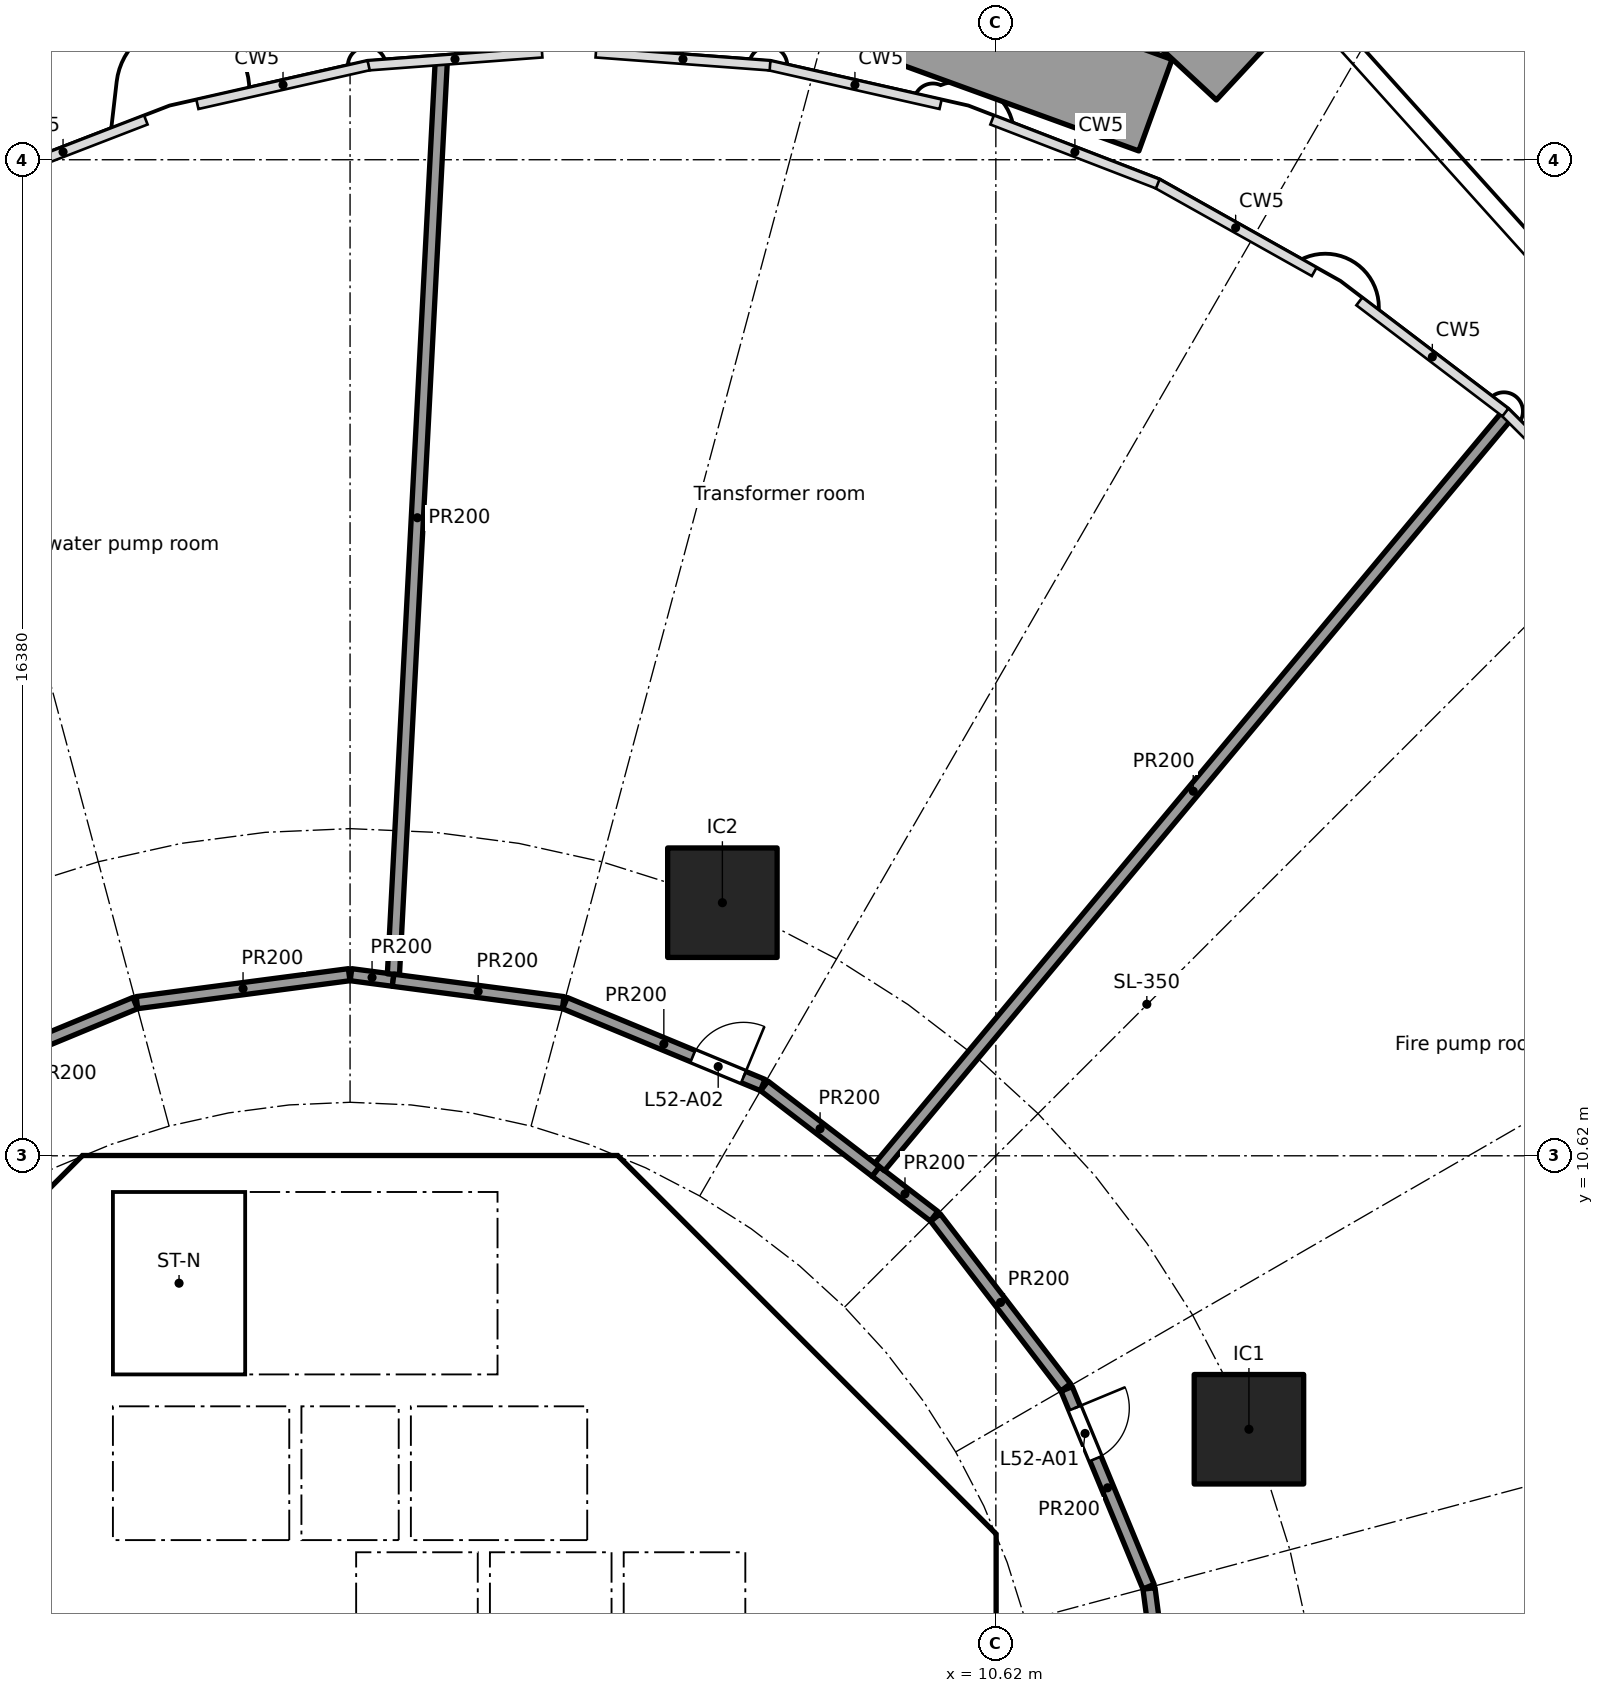
"""IFC4 building model, lengths in metres.
Left out: names, types, materials, properties, quantities, classifications, styles, units other than length and angle.
Written with IfcOpenShell. Run it as: python <this file> out.ifc"""

import sys

from ifc_helpers import new_model, si_unit, direction, frame, frame_2d, origin, origin_2d, place, context, subcontext, project, spatial, polyline, rectangle, outline, extrude, element, fill, save


model = new_model("IFC4")
c1 = context("Model", 3, precision=1e-05, world=origin(), true_north=direction((0.0, 1.0)))
c2 = subcontext(c1, "Body", "Model", "MODEL_VIEW")
j1 = project(units=[si_unit("LENGTHUNIT", "METRE"), si_unit("PLANEANGLEUNIT", "RADIAN")], contexts=[c1])
p1 = place(None, origin())
s1 = spatial("IfcSite", under=j1, at=p1, CompositionType="ELEMENT")
p2 = place(p1, origin())
s2 = spatial("IfcBuilding", under=s1, at=p2, CompositionType="ELEMENT")
p3 = place(p2, frame((0.0, 0.0, 206.6)))
s3 = spatial("IfcBuildingStorey", under=s2, at=p3, CompositionType="ELEMENT", Elevation=206.6)
for number, where, z_axis, x_axis in (
    (1, (14.782, 6.123, 0.0), (0.0, 0.0, 1.0), (1.0, 0.0, 0.0)),
    (2, (6.123, 14.782, 0.0), (0.0, 0.0, 1.0), (1.0, 0.0, 0.0)),
):
    element("IfcColumn", number, at=place(p3, frame(where, z_axis=z_axis, x_axis=x_axis)), inside=s3, PredefinedType="COLUMN", context=c2, shape_type="SweptSolid", body=[
        extrude(rectangle(XDim=1.8, YDim=1.8, at=origin_2d()), origin(), (0.0, 0.0, 1.0), 5.6),
    ])
p4 = place(p3, frame((11.664, 31.47, 0.0), z_axis=(0.0, 0.0, 1.0), x_axis=(0.733056421421, -0.680167834445, 0.0)))
e3 = element("IfcWall", 3, at=p4, inside=s3, PredefinedType="SOLIDWALL", context=c2, shape_type="SweptSolid", body=[
    extrude(rectangle(XDim=4.265, YDim=1.6, at=frame_2d((2.133, 0.0))), origin(), (0.0, 0.0, 1.0), 1.1),
])
p5 = place(p3, frame((13.244, 27.896, 0.0), z_axis=(0.0, 0.0, 1.0), x_axis=(-0.939927628881, 0.341373772376, 0.0)))
e4 = element("IfcWall", 4, at=p5, inside=s3, PredefinedType="SOLIDWALL", context=c2, shape_type="SweptSolid", body=[
    extrude(rectangle(XDim=10.033, YDim=1.6, at=frame_2d((5.017, 0.0))), origin(), (0.0, 0.0, 1.0), 1.1),
])
p6 = place(p3, frame((9.988, 4.613, 0.0), z_axis=(0.0, 0.0, 1.0), x_axis=(-0.707106781187, 0.707106781187, 0.0)))
e5 = element("IfcWall", 5, at=p6, inside=s3, PredefinedType="SHEAR", context=c2, shape_type="SweptSolid", body=[
    extrude(rectangle(XDim=7.602, YDim=0.6, at=frame_2d((3.801, 0.0))), origin(), (0.0, 0.0, 1.0), 5.34),
])
p7 = place(p6, frame((3.201, 0.0, 0.0)))
e6 = element("IfcOpeningElement", 6, at=p7, cuts=e5, PredefinedType="OPENING", context=c2, shape_type="SweptSolid", body=[
    extrude(rectangle(XDim=1.2, YDim=2.1, at=frame_2d((0.6, 1.05))), frame((0.0, 0.31, 0.0), z_axis=(0.0, -1.0, 0.0), x_axis=(1.0, 0.0, 0.0)), (0.0, 0.0, 1.0), 0.62),
])
p8 = place(p3, frame((-4.613, 9.988, 0.0), z_axis=(0.0, 0.0, 1.0), x_axis=(-0.707106781187, -0.707106781187, 0.0)))
e7 = element("IfcWall", 7, at=p8, inside=s3, PredefinedType="SHEAR", context=c2, shape_type="SweptSolid", body=[
    extrude(rectangle(XDim=7.602, YDim=0.6, at=frame_2d((3.801, 0.0))), origin(), (0.0, 0.0, 1.0), 5.34),
])
p9 = place(p8, frame((0.351, 0.0, 0.0)))
e8 = element("IfcOpeningElement", 8, at=p9, cuts=e7, PredefinedType="OPENING", context=c2, shape_type="SweptSolid", body=[
    extrude(rectangle(XDim=1.1, YDim=2.1, at=frame_2d((0.55, 1.05))), frame((0.0, 0.31, 0.0), z_axis=(0.0, -1.0, 0.0), x_axis=(1.0, 0.0, 0.0)), (0.0, 0.0, 1.0), 0.62),
])
p10 = place(p3, frame((4.0, 4.3, 0.0), z_axis=(0.0, 0.0, 1.0), x_axis=(0.0, 1.0, 0.0)))
e9 = element("IfcWall", 9, at=p10, inside=s3, PredefinedType="SOLIDWALL", context=c2, shape_type="SweptSolid", body=[
    extrude(rectangle(XDim=2.2, YDim=0.2, at=frame_2d((1.1, 0.0))), origin(), (0.0, 0.0, 1.0), 5.34),
])
p11 = place(p10, frame((0.55, 0.0, 0.0)))
e10 = element("IfcOpeningElement", 10, at=p11, cuts=e9, PredefinedType="OPENING", context=c2, shape_type="SweptSolid", body=[
    extrude(rectangle(XDim=1.1, YDim=2.1, at=frame_2d((0.55, 1.05))), frame((0.0, 0.11, 0.0), z_axis=(0.0, -1.0, 0.0), x_axis=(1.0, 0.0, 0.0)), (0.0, 0.0, 1.0), 0.22),
])
p12 = place(p3, frame((-4.0, 4.3, 0.0), z_axis=(0.0, 0.0, 1.0), x_axis=(0.0, 1.0, 0.0)))
e11 = element("IfcWall", 11, at=p12, inside=s3, PredefinedType="SOLIDWALL", context=c2, shape_type="SweptSolid", body=[
    extrude(rectangle(XDim=2.2, YDim=0.2, at=frame_2d((1.1, 0.0))), origin(), (0.0, 0.0, 1.0), 5.34),
])
p13 = place(p12, frame((0.55, 0.0, 0.0)))
e12 = element("IfcOpeningElement", 12, at=p13, cuts=e11, PredefinedType="OPENING", context=c2, shape_type="SweptSolid", body=[
    extrude(rectangle(XDim=1.1, YDim=2.1, at=frame_2d((0.55, 1.05))), frame((0.0, 0.11, 0.0), z_axis=(0.0, -1.0, 0.0), x_axis=(1.0, 0.0, 0.0)), (0.0, 0.0, 1.0), 0.22),
])
p14 = place(p3, frame((6.7, 4.0, 0.0), z_axis=(0.0, 0.0, 1.0), x_axis=(1.0, 0.0, 0.0)))
e13 = element("IfcWall", 13, at=p14, inside=s3, PredefinedType="SOLIDWALL", context=c2, shape_type="SweptSolid", body=[
    extrude(rectangle(XDim=3.325, YDim=0.2, at=frame_2d((1.662, 0.0))), origin(), (0.0, 0.0, 1.0), 5.34),
])
p15 = place(p14, frame((1.25, 0.0, 0.0)))
e14 = element("IfcOpeningElement", 14, at=p15, cuts=e13, PredefinedType="OPENING", context=c2, shape_type="SweptSolid", body=[
    extrude(rectangle(XDim=1.1, YDim=2.1, at=frame_2d((0.55, 1.05))), frame((0.0, 0.11, 0.0), z_axis=(0.0, -1.0, 0.0), x_axis=(1.0, 0.0, 0.0)), (0.0, 0.0, 1.0), 0.22),
])
p16 = place(p3, frame((4.0, 7.025, 0.0), z_axis=(0.0, 0.0, 1.0), x_axis=(0.0, 1.0, 0.0)))
e15 = element("IfcWall", 15, at=p16, inside=s3, PredefinedType="SOLIDWALL", context=c2, shape_type="SweptSolid", body=[
    extrude(rectangle(XDim=3.0, YDim=0.2, at=frame_2d((1.5, 0.0))), origin(), (0.0, 0.0, 1.0), 5.34),
])
p17 = place(p16, frame((0.925, 0.0, 0.0)))
e16 = element("IfcOpeningElement", 16, at=p17, cuts=e15, PredefinedType="OPENING", context=c2, shape_type="SweptSolid", body=[
    extrude(rectangle(XDim=1.1, YDim=2.1, at=frame_2d((0.55, 1.05))), frame((0.0, 0.11, 0.0), z_axis=(0.0, -1.0, 0.0), x_axis=(1.0, 0.0, 0.0)), (0.0, 0.0, 1.0), 0.22),
])
p18 = place(p3, origin())
e17 = element("IfcWall", 17, at=p18, inside=s3, PredefinedType="SHEAR", context=c2, shape_type="SweptSolid", body=[
    extrude(outline(polyline([(-4.152, 10.025), (-4.401, 9.776), (-4.825, 10.2), (-4.401, 10.625), (4.401, 10.625), (4.825, 10.2), (4.401, 9.776), (4.152, 10.025), (-4.152, 10.025)])), origin(), (0.0, 0.0, 1.0), 5.34),
])
p19 = place(p3, origin())
e18 = element("IfcWall", 18, at=p19, inside=s3, PredefinedType="SHEAR", context=c2, shape_type="SweptSolid", body=[
    extrude(outline(polyline([(9.776, -4.401), (10.025, -4.152), (10.025, -3.801), (10.025, 4.152), (9.776, 4.401), (10.2, 4.825), (10.625, 4.401), (10.625, -4.401), (10.2, -4.825), (9.776, -4.401)])), origin(), (0.0, 0.0, 1.0), 5.34),
])
for number, where, z_axis, x_axis in (
    (19, (-0.9, 4.3, 0.0), (0.0, 0.0, 1.0), (0.0, 1.0, 0.0)),
    (20, (0.9, 4.3, 0.0), (0.0, 0.0, 1.0), (0.0, 1.0, 0.0)),
):
    element("IfcWall", number, at=place(p3, frame(where, z_axis=z_axis, x_axis=x_axis)), inside=s3, PredefinedType="SOLIDWALL", context=c2, shape_type="SweptSolid", body=[
        extrude(rectangle(XDim=2.2, YDim=0.2, at=frame_2d((1.1, 0.0))), origin(), (0.0, 0.0, 1.0), 5.34),
    ])
p20 = place(p3, origin())
e21 = element("IfcWall", 21, at=p20, inside=s3, PredefinedType="SOLIDWALL", context=c2, shape_type="SweptSolid", body=[
    extrude(outline(polyline([(-6.7, 4.3), (6.7, 4.3), (6.7, 2.1), (6.5, 2.1), (6.5, 4.1), (4.5, 4.1), (4.5, 2.1), (4.3, 2.1), (4.3, 4.1), (2.3, 4.1), (2.3, 2.1), (2.1, 2.1), (2.1, 4.1), (0.1, 4.1), (0.1, 2.1), (-0.1, 2.1), (-0.1, 4.1), (-4.3, 4.1), (-4.3, 2.1), (-4.5, 2.1), (-4.5, 4.1), (-6.5, 4.1), (-6.5, 2.1), (-6.7, 2.1), (-6.7, 4.3)])), origin(), (0.0, 0.0, 1.0), 5.34),
])
p21 = place(p3, origin())
e22 = element("IfcWall", 22, at=p21, inside=s3, PredefinedType="SOLIDWALL", context=c2, shape_type="SweptSolid", body=[
    extrude(outline(polyline([(-3.9, 7.025), (-4.1, 7.025), (-4.1, 10.025), (-3.9, 10.025), (-3.9, 7.025)])), origin(), (0.0, 0.0, 1.0), 5.34),
])
p22 = place(p3, origin())
e23 = element("IfcWall", 23, at=p22, inside=s3, PredefinedType="SOLIDWALL", context=c2, shape_type="SweptSolid", body=[
    extrude(outline(polyline([(4.1, 6.5), (-4.1, 6.5), (-4.1, 7.025), (4.1, 7.025), (4.1, 6.5)])), origin(), (0.0, 0.0, 1.0), 5.34),
])
p23 = place(p3, origin())
e24 = element("IfcWall", 24, at=p23, inside=s3, PredefinedType="SOLIDWALL", context=c2, shape_type="SweptSolid", body=[
    extrude(outline(polyline([(7.025, -3.9), (6.7, -3.9), (6.7, 3.9), (7.025, 3.9), (7.025, -3.9)])), origin(), (0.0, 0.0, 1.0), 5.34),
])
p24 = place(p3, frame((-6.786, 11.784, 0.0), z_axis=(0.0, 0.0, 1.0), x_axis=(0.92386297064, 0.382723413813, 0.0)))
e25 = element("IfcWall", 25, at=p24, inside=s3, PredefinedType="PARTITIONING", context=c2, shape_type="SweptSolid", body=[
    extrude(rectangle(XDim=3.52, YDim=0.2, at=frame_2d((1.76, 0.0))), origin(), (0.0, 0.0, 1.0), 5.34),
])
p25 = place(p24, frame((0.342, 0.0, 0.0)))
e26 = element("IfcOpeningElement", 26, at=p25, cuts=e25, PredefinedType="OPENING", context=c2, shape_type="SweptSolid", body=[
    extrude(rectangle(XDim=0.9, YDim=2.1, at=frame_2d((0.45, 1.05))), frame((0.0, 0.11, 0.0), z_axis=(0.0, -1.0, 0.0), x_axis=(1.0, 0.0, 0.0)), (0.0, 0.0, 1.0), 0.22),
])
p26 = place(p3, frame((-3.505, 13.139, 0.0), z_axis=(0.0, 0.0, 1.0), x_axis=(0.991452406768, 0.130468866457, 0.0)))
e27 = element("IfcWall", 27, at=p26, inside=s3, PredefinedType="PARTITIONING", context=c2, shape_type="SweptSolid", body=[
    extrude(rectangle(XDim=3.52, YDim=0.2, at=frame_2d((1.76, 0.0))), origin(), (0.0, 0.0, 1.0), 5.34),
])
p27 = place(p3, frame((0.015, 13.598, 0.0), z_axis=(0.0, 0.0, 1.0), x_axis=(0.991473310532, -0.130309917135, 0.0)))
e28 = element("IfcWall", 28, at=p27, inside=s3, PredefinedType="PARTITIONING", context=c2, shape_type="SweptSolid", body=[
    extrude(rectangle(XDim=0.699, YDim=0.2, at=frame_2d((0.349, 0.0))), origin(), (0.0, 0.0, 1.0), 5.34),
])
p28 = place(p3, frame((0.713, 13.607, 0.0), z_axis=(0.0, 0.0, 1.0), x_axis=(0.052330372828, 0.998629827353, 0.0)))
e29 = element("IfcWall", 29, at=p28, inside=s3, PredefinedType="PARTITIONING", context=c2, shape_type="SweptSolid", body=[
    extrude(rectangle(XDim=15.032, YDim=0.2, at=frame_2d((7.516, 0.0))), origin(), (0.0, 0.0, 1.0), 5.34),
])
p29 = place(p3, frame((0.708, 13.507, 0.0), z_axis=(0.0, 0.0, 1.0), x_axis=(0.991447224467, -0.130508241489, 0.0)))
e30 = element("IfcWall", 30, at=p29, inside=s3, PredefinedType="PARTITIONING", context=c2, shape_type="SweptSolid", body=[
    extrude(rectangle(XDim=2.821, YDim=0.2, at=frame_2d((1.411, 0.0))), origin(), (0.0, 0.0, 1.0), 5.34),
])
p30 = place(p3, frame((3.534, 13.131, 0.0), z_axis=(0.0, 0.0, 1.0), x_axis=(0.92386297064, -0.382723413813, 0.0)))
e31 = element("IfcWall", 31, at=p30, inside=s3, PredefinedType="PARTITIONING", context=c2, shape_type="SweptSolid", body=[
    extrude(rectangle(XDim=3.52, YDim=0.2, at=frame_2d((1.76, 0.0))), origin(), (0.0, 0.0, 1.0), 5.34),
])
p31 = place(p30, frame((2.278, 0.0, 0.0)))
e32 = element("IfcOpeningElement", 32, at=p31, cuts=e31, PredefinedType="OPENING", context=c2, shape_type="SweptSolid", body=[
    extrude(rectangle(XDim=0.9, YDim=2.1, at=frame_2d((0.45, 1.05))), frame((0.0, 0.11, 0.0), z_axis=(0.0, -1.0, 0.0), x_axis=(1.0, 0.0, 0.0)), (0.0, 0.0, 1.0), 0.22),
])
p32 = place(p3, frame((6.812, 11.769, 0.0), z_axis=(0.0, 0.0, 1.0), x_axis=(0.793388779929, -0.60871524039, 0.0)))
e33 = element("IfcWall", 33, at=p32, inside=s3, PredefinedType="PARTITIONING", context=c2, shape_type="SweptSolid", body=[
    extrude(rectangle(XDim=2.312, YDim=0.2, at=frame_2d((1.156, 0.0))), origin(), (0.0, 0.0, 1.0), 5.34),
])
p33 = place(p3, frame((8.646, 10.361, 0.0), z_axis=(0.0, 0.0, 1.0), x_axis=(0.793427379392, -0.608664927223, 0.0)))
e34 = element("IfcWall", 34, at=p33, inside=s3, PredefinedType="PARTITIONING", context=c2, shape_type="SweptSolid", body=[
    extrude(rectangle(XDim=1.208, YDim=0.2, at=frame_2d((0.604, 0.0))), origin(), (0.0, 0.0, 1.0), 5.34),
])
p34 = place(p3, frame((8.711, 10.438, 0.0), z_axis=(0.0, 0.0, 1.0), x_axis=(0.640724447671, 0.767770917759, 0.0)))
e35 = element("IfcWall", 35, at=p34, inside=s3, PredefinedType="PARTITIONING", context=c2, shape_type="SweptSolid", body=[
    extrude(rectangle(XDim=16.092, YDim=0.2, at=frame_2d((8.046, 0.0))), origin(), (0.0, 0.0, 1.0), 5.34),
])
p35 = place(p3, frame((9.626, 9.605, 0.0), z_axis=(0.0, 0.0, 1.0), x_axis=(0.608697977542, -0.793402024283, 0.0)))
e36 = element("IfcWall", 36, at=p35, inside=s3, PredefinedType="PARTITIONING", context=c2, shape_type="SweptSolid", body=[
    extrude(rectangle(XDim=3.52, YDim=0.2, at=frame_2d((1.76, 0.0))), origin(), (0.0, 0.0, 1.0), 5.34),
])
p36 = place(p3, frame((11.784, 6.786, 0.0), z_axis=(0.0, 0.0, 1.0), x_axis=(0.382723413813, -0.92386297064, 0.0)))
e37 = element("IfcWall", 37, at=p36, inside=s3, PredefinedType="PARTITIONING", context=c2, shape_type="SweptSolid", body=[
    extrude(rectangle(XDim=3.52, YDim=0.2, at=frame_2d((1.76, 0.0))), origin(), (0.0, 0.0, 1.0), 5.34),
])
p37 = place(p36, frame((0.342, 0.0, 0.0)))
e38 = element("IfcOpeningElement", 38, at=p37, cuts=e37, PredefinedType="OPENING", context=c2, shape_type="SweptSolid", body=[
    extrude(rectangle(XDim=0.9, YDim=2.1, at=frame_2d((0.45, 1.05))), frame((0.0, 0.11, 0.0), z_axis=(0.0, -1.0, 0.0), x_axis=(1.0, 0.0, 0.0)), (0.0, 0.0, 1.0), 0.22),
])
p38 = place(p3, frame((13.139, 3.505, 0.0), z_axis=(0.0, 0.0, 1.0), x_axis=(0.130504367157, -0.991447734454, 0.0)))
e39 = element("IfcWall", 39, at=p38, inside=s3, PredefinedType="PARTITIONING", context=c2, shape_type="SweptSolid", body=[
    extrude(rectangle(XDim=1.773, YDim=0.2, at=frame_2d((0.887, 0.0))), origin(), (0.0, 0.0, 1.0), 5.34),
])
p39 = place(p3, frame((28.659, 3.744, 0.0), z_axis=(0.0, 0.0, 1.0), x_axis=(-0.991573202769, -0.129547611132, 0.0)))
e40 = element("IfcWall", 40, at=p39, inside=s3, PredefinedType="PARTITIONING", context=c2, shape_type="SweptSolid", body=[
    extrude(rectangle(XDim=12.619, YDim=0.2, at=frame_2d((6.31, 0.0))), origin(), (0.0, 0.0, 1.0), 5.34),
])
p40 = place(p11, origin())
e41 = element("IfcDoor", 41, at=p40, inside=s3, OperationType="DOUBLE_DOOR_SLIDING", PredefinedType="DOOR", context=c2, shape_type="SweptSolid", body=[
    extrude(rectangle(XDim=1.1, YDim=2.1, at=frame_2d((0.55, 1.05))), frame((0.0, 0.025, 0.0), z_axis=(0.0, -1.0, 0.0), x_axis=(1.0, 0.0, 0.0)), (0.0, 0.0, 1.0), 0.05),
])
fill(e10, e41)
p41 = place(p13, origin())
e42 = element("IfcDoor", 42, at=p41, inside=s3, OperationType="DOUBLE_DOOR_SLIDING", PredefinedType="DOOR", context=c2, shape_type="SweptSolid", body=[
    extrude(rectangle(XDim=1.1, YDim=2.1, at=frame_2d((0.55, 1.05))), frame((0.0, 0.025, 0.0), z_axis=(0.0, -1.0, 0.0), x_axis=(1.0, 0.0, 0.0)), (0.0, 0.0, 1.0), 0.05),
])
fill(e12, e42)
p42 = place(p15, frame((1.1, 0.0, 0.0), x_axis=(-1.0, 0.0, 0.0)))
e43 = element("IfcDoor", 43, at=p42, inside=s3, OperationType="SINGLE_SWING_RIGHT", PredefinedType="DOOR", context=c2, shape_type="SweptSolid", body=[
    extrude(rectangle(XDim=1.1, YDim=2.1, at=frame_2d((0.55, 1.05))), frame((0.0, 0.025, 0.0), z_axis=(0.0, -1.0, 0.0), x_axis=(1.0, 0.0, 0.0)), (0.0, 0.0, 1.0), 0.05),
])
fill(e14, e43)
p43 = place(p17, origin())
e44 = element("IfcDoor", 44, at=p43, inside=s3, OperationType="SINGLE_SWING_LEFT", PredefinedType="DOOR", context=c2, shape_type="SweptSolid", body=[
    extrude(rectangle(XDim=1.1, YDim=2.1, at=frame_2d((0.55, 1.05))), frame((0.0, 0.025, 0.0), z_axis=(0.0, -1.0, 0.0), x_axis=(1.0, 0.0, 0.0)), (0.0, 0.0, 1.0), 0.05),
])
fill(e16, e44)
p44 = place(p7, origin())
e45 = element("IfcDoor", 45, at=p44, inside=s3, OperationType="SINGLE_SWING_LEFT", PredefinedType="DOOR", context=c2, shape_type="SweptSolid", body=[
    extrude(rectangle(XDim=1.2, YDim=2.1, at=frame_2d((0.6, 1.05))), frame((0.0, 0.025, 0.0), z_axis=(0.0, -1.0, 0.0), x_axis=(1.0, 0.0, 0.0)), (0.0, 0.0, 1.0), 0.05),
])
fill(e6, e45)
p45 = place(p9, origin())
e46 = element("IfcDoor", 46, at=p45, inside=s3, OperationType="SINGLE_SWING_LEFT", PredefinedType="DOOR", context=c2, shape_type="SweptSolid", body=[
    extrude(rectangle(XDim=1.1, YDim=2.1, at=frame_2d((0.55, 1.05))), frame((0.0, 0.025, 0.0), z_axis=(0.0, -1.0, 0.0), x_axis=(1.0, 0.0, 0.0)), (0.0, 0.0, 1.0), 0.05),
])
fill(e8, e46)
p46 = place(p37, origin())
e47 = element("IfcDoor", 47, at=p46, inside=s3, OperationType="SINGLE_SWING_LEFT", PredefinedType="DOOR", context=c2, shape_type="SweptSolid", body=[
    extrude(rectangle(XDim=0.9, YDim=2.1, at=frame_2d((0.45, 1.05))), frame((0.0, 0.025, 0.0), z_axis=(0.0, -1.0, 0.0), x_axis=(1.0, 0.0, 0.0)), (0.0, 0.0, 1.0), 0.05),
])
fill(e38, e47)
p47 = place(p31, origin())
e48 = element("IfcDoor", 48, at=p47, inside=s3, OperationType="SINGLE_SWING_RIGHT", PredefinedType="DOOR", context=c2, shape_type="SweptSolid", body=[
    extrude(rectangle(XDim=0.9, YDim=2.1, at=frame_2d((0.45, 1.05))), frame((0.0, 0.025, 0.0), z_axis=(0.0, -1.0, 0.0), x_axis=(1.0, 0.0, 0.0)), (0.0, 0.0, 1.0), 0.05),
])
fill(e32, e48)
save(model, sys.argv[1])
